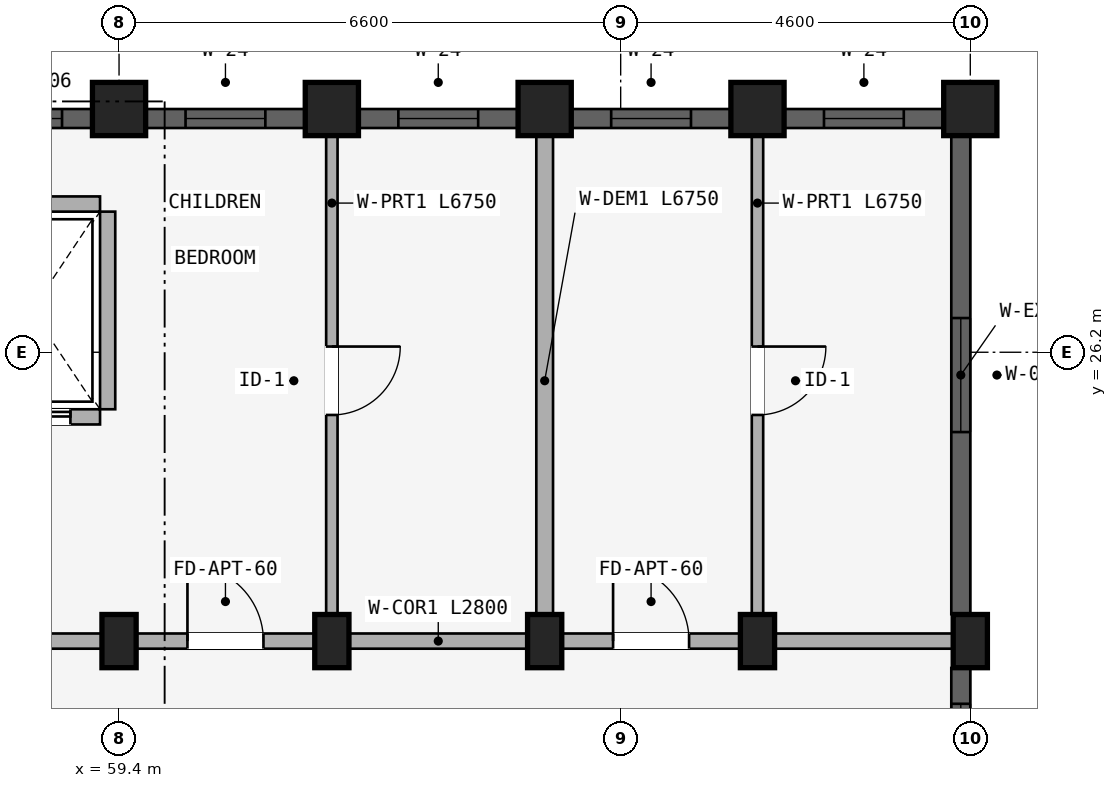
"""IFC4 building model, lengths in metres.
Left out: names, types, materials, properties, quantities, classifications, styles, units other than length and angle.
Written with IfcOpenShell. Run it as: python <this file> out.ifc"""

import sys

from ifc_helpers import new_model, si_unit, direction, frame, frame_2d, origin, origin_2d, place, context, subcontext, project, spatial, rectangle, extrude, element, fill, save


model = new_model("IFC4")
c1 = context("Model", 3, precision=1e-05, world=origin(), true_north=direction((0.0, 1.0)))
c2 = subcontext(c1, "Body", "Model", "MODEL_VIEW")
j1 = project(units=[si_unit("LENGTHUNIT", "METRE"), si_unit("PLANEANGLEUNIT", "RADIAN")], contexts=[c1])
p1 = place(None, origin())
s1 = spatial("IfcSite", under=j1, at=p1, CompositionType="ELEMENT")
p2 = place(p1, origin())
s2 = spatial("IfcBuilding", under=s1, at=p2, CompositionType="ELEMENT")
p3 = place(p2, frame((0.0, 0.0, 21.3)))
s3 = spatial("IfcBuildingStorey", under=s2, at=p3, CompositionType="ELEMENT", Elevation=21.3)
p4 = place(p3, frame((59.4, 29.4, 0.0), z_axis=(0.0, 0.0, 1.0), x_axis=(1.0, 0.0, 0.0)))
e1 = element("IfcColumn", 1, at=p4, inside=s3, PredefinedType="COLUMN", context=c2, shape_type="SweptSolid", body=[
    extrude(rectangle(XDim=0.7, YDim=0.7, at=origin_2d()), origin(), (0.0, 0.0, 1.0), 2.93),
])
p5 = place(p3, frame((59.4, 22.4, 0.0), z_axis=(0.0, 0.0, 1.0), x_axis=(1.0, 0.0, 0.0)))
e2 = element("IfcColumn", 2, at=p5, inside=s3, PredefinedType="COLUMN", context=c2, shape_type="SweptSolid", body=[
    extrude(rectangle(XDim=0.45, YDim=0.7, at=origin_2d()), origin(), (0.0, 0.0, 1.0), 2.93),
])
p6 = place(p3, frame((62.2, 29.4, 0.0), z_axis=(0.0, 0.0, 1.0), x_axis=(1.0, 0.0, 0.0)))
e3 = element("IfcColumn", 3, at=p6, inside=s3, PredefinedType="COLUMN", context=c2, shape_type="SweptSolid", body=[
    extrude(rectangle(XDim=0.7, YDim=0.7, at=origin_2d()), origin(), (0.0, 0.0, 1.0), 2.93),
])
p7 = place(p3, frame((62.2, 22.4, 0.0), z_axis=(0.0, 0.0, 1.0), x_axis=(1.0, 0.0, 0.0)))
e4 = element("IfcColumn", 4, at=p7, inside=s3, PredefinedType="COLUMN", context=c2, shape_type="SweptSolid", body=[
    extrude(rectangle(XDim=0.45, YDim=0.7, at=origin_2d()), origin(), (0.0, 0.0, 1.0), 2.93),
])
p8 = place(p3, frame((65.0, 29.4, 0.0), z_axis=(0.0, 0.0, 1.0), x_axis=(1.0, 0.0, 0.0)))
e5 = element("IfcColumn", 5, at=p8, inside=s3, PredefinedType="COLUMN", context=c2, shape_type="SweptSolid", body=[
    extrude(rectangle(XDim=0.7, YDim=0.7, at=origin_2d()), origin(), (0.0, 0.0, 1.0), 2.93),
])
p9 = place(p3, frame((65.0, 22.4, 0.0), z_axis=(0.0, 0.0, 1.0), x_axis=(1.0, 0.0, 0.0)))
e6 = element("IfcColumn", 6, at=p9, inside=s3, PredefinedType="COLUMN", context=c2, shape_type="SweptSolid", body=[
    extrude(rectangle(XDim=0.45, YDim=0.7, at=origin_2d()), origin(), (0.0, 0.0, 1.0), 2.93),
])
p10 = place(p3, frame((67.8, 29.4, 0.0), z_axis=(0.0, 0.0, 1.0), x_axis=(1.0, 0.0, 0.0)))
e7 = element("IfcColumn", 7, at=p10, inside=s3, PredefinedType="COLUMN", context=c2, shape_type="SweptSolid", body=[
    extrude(rectangle(XDim=0.7, YDim=0.7, at=origin_2d()), origin(), (0.0, 0.0, 1.0), 2.93),
])
p11 = place(p3, frame((67.8, 22.4, 0.0), z_axis=(0.0, 0.0, 1.0), x_axis=(1.0, 0.0, 0.0)))
e8 = element("IfcColumn", 8, at=p11, inside=s3, PredefinedType="COLUMN", context=c2, shape_type="SweptSolid", body=[
    extrude(rectangle(XDim=0.45, YDim=0.7, at=origin_2d()), origin(), (0.0, 0.0, 1.0), 2.93),
])
p12 = place(p3, frame((70.6, 29.4, 0.0), z_axis=(0.0, 0.0, 1.0), x_axis=(1.0, 0.0, 0.0)))
e9 = element("IfcColumn", 9, at=p12, inside=s3, PredefinedType="COLUMN", context=c2, shape_type="SweptSolid", body=[
    extrude(rectangle(XDim=0.7, YDim=0.7, at=origin_2d()), origin(), (0.0, 0.0, 1.0), 2.93),
])
p13 = place(p3, frame((70.6, 22.4, 0.0), z_axis=(0.0, 0.0, 1.0), x_axis=(1.0, 0.0, 0.0)))
e10 = element("IfcColumn", 10, at=p13, inside=s3, PredefinedType="COLUMN", context=c2, shape_type="SweptSolid", body=[
    extrude(rectangle(XDim=0.45, YDim=0.7, at=origin_2d()), origin(), (0.0, 0.0, 1.0), 2.93),
])
p14 = place(p3, frame((59.25, 28.05, 0.0), z_axis=(0.0, 0.0, 1.0), x_axis=(0.0, -1.0, 0.0)))
e11 = element("IfcWall", 11, at=p14, inside=s3, PredefinedType="STANDARD", context=c2, shape_type="SweptSolid", body=[
    extrude(rectangle(XDim=2.6, YDim=0.2, at=frame_2d((1.3, 0.0))), origin(), (0.0, 0.0, 1.0), 2.372),
])
p15 = place(p3, frame((57.35, 28.15, 0.0), z_axis=(0.0, 0.0, 1.0), x_axis=(1.0, 0.0, 0.0)))
e12 = element("IfcWall", 12, at=p15, inside=s3, PredefinedType="STANDARD", context=c2, shape_type="SweptSolid", body=[
    extrude(rectangle(XDim=1.8, YDim=0.2, at=frame_2d((0.9, 0.0))), origin(), (0.0, 0.0, 1.0), 2.93),
])
p16 = place(p3, frame((57.35, 25.35, 0.0), z_axis=(0.0, 0.0, 1.0), x_axis=(1.0, 0.0, 0.0)))
e13 = element("IfcWall", 13, at=p16, inside=s3, PredefinedType="STANDARD", context=c2, shape_type="SweptSolid", body=[
    extrude(rectangle(XDim=1.8, YDim=0.2, at=frame_2d((0.9, 0.0))), origin(), (0.0, 0.0, 1.0), 2.93),
])
p17 = place(p16, frame((0.39, 0.0, 0.0)))
e14 = element("IfcOpeningElement", 14, at=p17, cuts=e13, PredefinedType="OPENING", context=c2, shape_type="SweptSolid", body=[
    extrude(rectangle(XDim=1.02, YDim=2.15, at=frame_2d((0.51, 1.075))), frame((0.0, 0.11, 0.0), z_axis=(0.0, -1.0, 0.0), x_axis=(1.0, 0.0, 0.0)), (0.0, 0.0, 1.0), 0.22),
])
p18 = place(p3, frame((53.75, 22.4, 0.0), z_axis=(0.0, 0.0, 1.0), x_axis=(1.0, 0.0, 0.0)))
e15 = element("IfcWall", 15, at=p18, inside=s3, PredefinedType="STANDARD", context=c2, shape_type="SweptSolid", body=[
    extrude(rectangle(XDim=5.6, YDim=0.2, at=frame_2d((2.8, 0.0))), origin(), (0.0, 0.0, 1.0), 2.372),
])
p19 = place(p18, frame((1.91, 0.0, 0.0)))
e16 = element("IfcOpeningElement", 16, at=p19, cuts=e15, PredefinedType="OPENING", context=c2, shape_type="SweptSolid", body=[
    extrude(rectangle(XDim=1.22, YDim=2.15, at=frame_2d((0.61, 1.075))), frame((0.0, 0.11, 0.0), z_axis=(0.0, -1.0, 0.0), x_axis=(1.0, 0.0, 0.0)), (0.0, 0.0, 1.0), 0.22),
])
p20 = place(p3, frame((59.4, 22.4, 0.0), z_axis=(0.0, 0.0, 1.0), x_axis=(1.0, 0.0, 0.0)))
e17 = element("IfcWall", 17, at=p20, inside=s3, PredefinedType="STANDARD", context=c2, shape_type="SweptSolid", body=[
    extrude(rectangle(XDim=2.8, YDim=0.2, at=frame_2d((1.4, 0.0))), origin(), (0.0, 0.0, 1.0), 2.372),
])
p21 = place(p20, frame((0.9, 0.0, 0.0)))
e18 = element("IfcOpeningElement", 18, at=p21, cuts=e17, PredefinedType="OPENING", context=c2, shape_type="SweptSolid", body=[
    extrude(rectangle(XDim=1.0, YDim=2.15, at=frame_2d((0.5, 1.075))), frame((0.0, 0.11, 0.0), z_axis=(0.0, -1.0, 0.0), x_axis=(1.0, 0.0, 0.0)), (0.0, 0.0, 1.0), 0.22),
])
p22 = place(p3, frame((62.2, 22.4, 0.0), z_axis=(0.0, 0.0, 1.0), x_axis=(1.0, 0.0, 0.0)))
e19 = element("IfcWall", 19, at=p22, inside=s3, PredefinedType="STANDARD", context=c2, shape_type="SweptSolid", body=[
    extrude(rectangle(XDim=2.8, YDim=0.2, at=frame_2d((1.4, 0.0))), origin(), (0.0, 0.0, 1.0), 2.372),
])
p23 = place(p3, frame((65.0, 22.4, 0.0), z_axis=(0.0, 0.0, 1.0), x_axis=(1.0, 0.0, 0.0)))
e20 = element("IfcWall", 20, at=p23, inside=s3, PredefinedType="STANDARD", context=c2, shape_type="SweptSolid", body=[
    extrude(rectangle(XDim=2.8, YDim=0.2, at=frame_2d((1.4, 0.0))), origin(), (0.0, 0.0, 1.0), 2.372),
])
p24 = place(p23, frame((0.9, 0.0, 0.0)))
e21 = element("IfcOpeningElement", 21, at=p24, cuts=e20, PredefinedType="OPENING", context=c2, shape_type="SweptSolid", body=[
    extrude(rectangle(XDim=1.0, YDim=2.15, at=frame_2d((0.5, 1.075))), frame((0.0, 0.11, 0.0), z_axis=(0.0, -1.0, 0.0), x_axis=(1.0, 0.0, 0.0)), (0.0, 0.0, 1.0), 0.22),
])
p25 = place(p3, frame((67.8, 22.4, 0.0), z_axis=(0.0, 0.0, 1.0), x_axis=(1.0, 0.0, 0.0)))
e22 = element("IfcWall", 22, at=p25, inside=s3, PredefinedType="STANDARD", context=c2, shape_type="SweptSolid", body=[
    extrude(rectangle(XDim=2.8, YDim=0.2, at=frame_2d((1.4, 0.0))), origin(), (0.0, 0.0, 1.0), 2.372),
])
p26 = place(p3, frame((62.2, 29.2, 0.0), z_axis=(0.0, 0.0, 1.0), x_axis=(0.0, -1.0, 0.0)))
e23 = element("IfcWall", 23, at=p26, inside=s3, PredefinedType="PARTITIONING", context=c2, shape_type="SweptSolid", body=[
    extrude(rectangle(XDim=6.75, YDim=0.15, at=frame_2d((3.375, 0.0))), origin(), (0.0, 0.0, 1.0), 2.372),
])
p27 = place(p26, frame((2.925, 0.0, 0.0)))
e24 = element("IfcOpeningElement", 24, at=p27, cuts=e23, PredefinedType="OPENING", context=c2, shape_type="SweptSolid", body=[
    extrude(rectangle(XDim=0.9, YDim=2.1, at=frame_2d((0.45, 1.05))), frame((0.0, 0.085, 0.0), z_axis=(0.0, -1.0, 0.0), x_axis=(1.0, 0.0, 0.0)), (0.0, 0.0, 1.0), 0.17),
])
p28 = place(p3, frame((65.0, 29.2, 0.0), z_axis=(0.0, 0.0, 1.0), x_axis=(0.0, -1.0, 0.0)))
e25 = element("IfcWall", 25, at=p28, inside=s3, PredefinedType="STANDARD", context=c2, shape_type="SweptSolid", body=[
    extrude(rectangle(XDim=6.75, YDim=0.22, at=frame_2d((3.375, 0.0))), origin(), (0.0, 0.0, 1.0), 2.372),
])
p29 = place(p3, frame((67.8, 29.2, 0.0), z_axis=(0.0, 0.0, 1.0), x_axis=(0.0, -1.0, 0.0)))
e26 = element("IfcWall", 26, at=p29, inside=s3, PredefinedType="PARTITIONING", context=c2, shape_type="SweptSolid", body=[
    extrude(rectangle(XDim=6.75, YDim=0.15, at=frame_2d((3.375, 0.0))), origin(), (0.0, 0.0, 1.0), 2.372),
])
p30 = place(p29, frame((2.925, 0.0, 0.0)))
e27 = element("IfcOpeningElement", 27, at=p30, cuts=e26, PredefinedType="OPENING", context=c2, shape_type="SweptSolid", body=[
    extrude(rectangle(XDim=0.9, YDim=2.1, at=frame_2d((0.45, 1.05))), frame((0.0, 0.085, 0.0), z_axis=(0.0, -1.0, 0.0), x_axis=(1.0, 0.0, 0.0)), (0.0, 0.0, 1.0), 0.17),
])
p31 = place(p3, frame((56.628, 29.275, 0.0), z_axis=(0.0, 0.0, 1.0), x_axis=(1.0, 0.0, 0.0)))
e28 = element("IfcWall", 28, at=p31, inside=s3, PredefinedType="STANDARD", context=c2, shape_type="SweptSolid", body=[
    extrude(rectangle(XDim=2.422, YDim=0.25, at=frame_2d((1.211, 0.0))), origin(), (0.0, 0.0, 1.0), 2.472),
])
p32 = place(p31, frame((0.822, 0.0, 0.772)))
e29 = element("IfcOpeningElement", 29, at=p32, cuts=e28, PredefinedType="OPENING", context=c2, shape_type="SweptSolid", body=[
    extrude(rectangle(XDim=1.2, YDim=1.5, at=frame_2d((0.6, 0.75))), frame((0.0, 0.135, 0.0), z_axis=(0.0, -1.0, 0.0), x_axis=(1.0, 0.0, 0.0)), (0.0, 0.0, 1.0), 0.27),
])
p33 = place(p3, frame((59.753, 29.275, 0.0), z_axis=(0.0, 0.0, 1.0), x_axis=(1.0, 0.0, 0.0)))
e30 = element("IfcWall", 30, at=p33, inside=s3, PredefinedType="STANDARD", context=c2, shape_type="SweptSolid", body=[
    extrude(rectangle(XDim=2.093, YDim=0.25, at=frame_2d((1.046, 0.0))), origin(), (0.0, 0.0, 1.0), 2.472),
])
p34 = place(p33, frame((0.521, 0.0, 0.88)))
e31 = element("IfcOpeningElement", 31, at=p34, cuts=e30, PredefinedType="OPENING", context=c2, shape_type="SweptSolid", body=[
    extrude(rectangle(XDim=1.05, YDim=1.25, at=frame_2d((0.525, 0.625))), frame((0.0, 0.135, 0.0), z_axis=(0.0, -1.0, 0.0), x_axis=(1.0, 0.0, 0.0)), (0.0, 0.0, 1.0), 0.27),
])
p35 = place(p3, frame((62.553, 29.275, 0.0), z_axis=(0.0, 0.0, 1.0), x_axis=(1.0, 0.0, 0.0)))
e32 = element("IfcWall", 32, at=p35, inside=s3, PredefinedType="STANDARD", context=c2, shape_type="SweptSolid", body=[
    extrude(rectangle(XDim=2.093, YDim=0.25, at=frame_2d((1.046, 0.0))), origin(), (0.0, 0.0, 1.0), 2.472),
])
p36 = place(p35, frame((0.521, 0.0, 0.88)))
e33 = element("IfcOpeningElement", 33, at=p36, cuts=e32, PredefinedType="OPENING", context=c2, shape_type="SweptSolid", body=[
    extrude(rectangle(XDim=1.05, YDim=1.25, at=frame_2d((0.525, 0.625))), frame((0.0, 0.135, 0.0), z_axis=(0.0, -1.0, 0.0), x_axis=(1.0, 0.0, 0.0)), (0.0, 0.0, 1.0), 0.27),
])
p37 = place(p3, frame((65.354, 29.275, 0.0), z_axis=(0.0, 0.0, 1.0), x_axis=(1.0, 0.0, 0.0)))
e34 = element("IfcWall", 34, at=p37, inside=s3, PredefinedType="STANDARD", context=c2, shape_type="SweptSolid", body=[
    extrude(rectangle(XDim=2.093, YDim=0.25, at=frame_2d((1.046, 0.0))), origin(), (0.0, 0.0, 1.0), 2.472),
])
p38 = place(p37, frame((0.521, 0.0, 0.88)))
e35 = element("IfcOpeningElement", 35, at=p38, cuts=e34, PredefinedType="OPENING", context=c2, shape_type="SweptSolid", body=[
    extrude(rectangle(XDim=1.05, YDim=1.25, at=frame_2d((0.525, 0.625))), frame((0.0, 0.135, 0.0), z_axis=(0.0, -1.0, 0.0), x_axis=(1.0, 0.0, 0.0)), (0.0, 0.0, 1.0), 0.27),
])
p39 = place(p3, frame((68.154, 29.275, 0.0), z_axis=(0.0, 0.0, 1.0), x_axis=(1.0, 0.0, 0.0)))
e36 = element("IfcWall", 36, at=p39, inside=s3, PredefinedType="STANDARD", context=c2, shape_type="SweptSolid", body=[
    extrude(rectangle(XDim=2.093, YDim=0.25, at=frame_2d((1.046, 0.0))), origin(), (0.0, 0.0, 1.0), 2.472),
])
p40 = place(p39, frame((0.521, 0.0, 0.88)))
e37 = element("IfcOpeningElement", 37, at=p40, cuts=e36, PredefinedType="OPENING", context=c2, shape_type="SweptSolid", body=[
    extrude(rectangle(XDim=1.05, YDim=1.25, at=frame_2d((0.525, 0.625))), frame((0.0, 0.135, 0.0), z_axis=(0.0, -1.0, 0.0), x_axis=(1.0, 0.0, 0.0)), (0.0, 0.0, 1.0), 0.27),
])
p41 = place(p3, frame((70.475, 29.046, 0.0), z_axis=(0.0, 0.0, 1.0), x_axis=(0.0, -1.0, 0.0)))
e38 = element("IfcWall", 38, at=p41, inside=s3, PredefinedType="STANDARD", context=c2, shape_type="SweptSolid", body=[
    extrude(rectangle(XDim=6.293, YDim=0.25, at=frame_2d((3.146, 0.0))), origin(), (0.0, 0.0, 1.0), 2.372),
])
p42 = place(p41, frame((2.396, 0.0, 0.522)))
e39 = element("IfcOpeningElement", 39, at=p42, cuts=e38, PredefinedType="OPENING", context=c2, shape_type="SweptSolid", body=[
    extrude(rectangle(XDim=1.5, YDim=1.65, at=frame_2d((0.75, 0.825))), frame((0.0, 0.135, 0.0), z_axis=(0.0, -1.0, 0.0), x_axis=(1.0, 0.0, 0.0)), (0.0, 0.0, 1.0), 0.27),
])
p43 = place(p3, frame((70.475, 22.046, 0.0), z_axis=(0.0, 0.0, 1.0), x_axis=(0.0, -1.0, 0.0)))
e40 = element("IfcWall", 40, at=p43, inside=s3, PredefinedType="STANDARD", context=c2, shape_type="SweptSolid", body=[
    extrude(rectangle(XDim=1.693, YDim=0.25, at=frame_2d((0.846, 0.0))), origin(), (0.0, 0.0, 1.0), 2.372),
])
p44 = place(p43, frame((0.471, 0.0, 0.88)))
e41 = element("IfcOpeningElement", 41, at=p44, cuts=e40, PredefinedType="OPENING", context=c2, shape_type="SweptSolid", body=[
    extrude(rectangle(XDim=0.75, YDim=1.05, at=frame_2d((0.375, 0.525))), frame((0.0, 0.135, 0.0), z_axis=(0.0, -1.0, 0.0), x_axis=(1.0, 0.0, 0.0)), (0.0, 0.0, 1.0), 0.27),
])
p45 = place(p32, origin())
e42 = element("IfcWindow", 42, at=p45, inside=s3, PartitioningType="SINGLE_PANEL", PredefinedType="WINDOW", context=c2, shape_type="SweptSolid", body=[
    extrude(rectangle(XDim=1.2, YDim=1.5, at=frame_2d((0.6, 0.75))), frame((0.0, 0.03, 0.0), z_axis=(0.0, -1.0, 0.0), x_axis=(1.0, 0.0, 0.0)), (0.0, 0.0, 1.0), 0.06),
])
fill(e29, e42)
p46 = place(p34, origin())
e43 = element("IfcWindow", 43, at=p46, inside=s3, PartitioningType="SINGLE_PANEL", PredefinedType="WINDOW", context=c2, shape_type="SweptSolid", body=[
    extrude(rectangle(XDim=1.05, YDim=1.25, at=frame_2d((0.525, 0.625))), frame((0.0, 0.03, 0.0), z_axis=(0.0, -1.0, 0.0), x_axis=(1.0, 0.0, 0.0)), (0.0, 0.0, 1.0), 0.06),
])
fill(e31, e43)
p47 = place(p36, origin())
e44 = element("IfcWindow", 44, at=p47, inside=s3, PartitioningType="SINGLE_PANEL", PredefinedType="WINDOW", context=c2, shape_type="SweptSolid", body=[
    extrude(rectangle(XDim=1.05, YDim=1.25, at=frame_2d((0.525, 0.625))), frame((0.0, 0.03, 0.0), z_axis=(0.0, -1.0, 0.0), x_axis=(1.0, 0.0, 0.0)), (0.0, 0.0, 1.0), 0.06),
])
fill(e33, e44)
p48 = place(p38, origin())
e45 = element("IfcWindow", 45, at=p48, inside=s3, PartitioningType="SINGLE_PANEL", PredefinedType="WINDOW", context=c2, shape_type="SweptSolid", body=[
    extrude(rectangle(XDim=1.05, YDim=1.25, at=frame_2d((0.525, 0.625))), frame((0.0, 0.03, 0.0), z_axis=(0.0, -1.0, 0.0), x_axis=(1.0, 0.0, 0.0)), (0.0, 0.0, 1.0), 0.06),
])
fill(e35, e45)
p49 = place(p40, origin())
e46 = element("IfcWindow", 46, at=p49, inside=s3, PartitioningType="SINGLE_PANEL", PredefinedType="WINDOW", context=c2, shape_type="SweptSolid", body=[
    extrude(rectangle(XDim=1.05, YDim=1.25, at=frame_2d((0.525, 0.625))), frame((0.0, 0.03, 0.0), z_axis=(0.0, -1.0, 0.0), x_axis=(1.0, 0.0, 0.0)), (0.0, 0.0, 1.0), 0.06),
])
fill(e37, e46)
p50 = place(p42, origin())
e47 = element("IfcWindow", 47, at=p50, inside=s3, PartitioningType="DOUBLE_PANEL_VERTICAL", PredefinedType="WINDOW", context=c2, shape_type="SweptSolid", body=[
    extrude(rectangle(XDim=1.5, YDim=1.65, at=frame_2d((0.75, 0.825))), frame((0.0, 0.03, 0.0), z_axis=(0.0, -1.0, 0.0), x_axis=(1.0, 0.0, 0.0)), (0.0, 0.0, 1.0), 0.06),
])
fill(e39, e47)
p51 = place(p44, origin())
e48 = element("IfcWindow", 48, at=p51, inside=s3, PartitioningType="SINGLE_PANEL", PredefinedType="WINDOW", context=c2, shape_type="SweptSolid", body=[
    extrude(rectangle(XDim=0.75, YDim=1.05, at=frame_2d((0.375, 0.525))), frame((0.0, 0.03, 0.0), z_axis=(0.0, -1.0, 0.0), x_axis=(1.0, 0.0, 0.0)), (0.0, 0.0, 1.0), 0.06),
])
fill(e41, e48)
p52 = place(p17, origin())
e49 = element("IfcDoor", 49, at=p52, inside=s3, OperationType="SLIDING_TO_RIGHT", PredefinedType="DOOR", context=c2, shape_type="SweptSolid", body=[
    extrude(rectangle(XDim=1.02, YDim=2.15, at=frame_2d((0.51, 1.075))), frame((0.0, 0.025, 0.0), z_axis=(0.0, -1.0, 0.0), x_axis=(1.0, 0.0, 0.0)), (0.0, 0.0, 1.0), 0.05),
])
fill(e14, e49)
p53 = place(p21, frame((1.0, 0.0, 0.0), z_axis=(0.0, 0.0, 1.0), x_axis=(-1.0, 0.0, 0.0)))
e50 = element("IfcDoor", 50, at=p53, inside=s3, OperationType="SINGLE_SWING_RIGHT", PredefinedType="DOOR", context=c2, shape_type="SweptSolid", body=[
    extrude(rectangle(XDim=1.0, YDim=2.15, at=frame_2d((0.5, 1.075))), frame((0.0, 0.025, 0.0), z_axis=(0.0, -1.0, 0.0), x_axis=(1.0, 0.0, 0.0)), (0.0, 0.0, 1.0), 0.05),
])
fill(e18, e50)
p54 = place(p24, frame((1.0, 0.0, 0.0), z_axis=(0.0, 0.0, 1.0), x_axis=(-1.0, 0.0, 0.0)))
e51 = element("IfcDoor", 51, at=p54, inside=s3, OperationType="SINGLE_SWING_RIGHT", PredefinedType="DOOR", context=c2, shape_type="SweptSolid", body=[
    extrude(rectangle(XDim=1.0, YDim=2.15, at=frame_2d((0.5, 1.075))), frame((0.0, 0.025, 0.0), z_axis=(0.0, -1.0, 0.0), x_axis=(1.0, 0.0, 0.0)), (0.0, 0.0, 1.0), 0.05),
])
fill(e21, e51)
p55 = place(p27, origin())
e52 = element("IfcDoor", 52, at=p55, inside=s3, OperationType="SINGLE_SWING_LEFT", PredefinedType="DOOR", context=c2, shape_type="SweptSolid", body=[
    extrude(rectangle(XDim=0.9, YDim=2.1, at=frame_2d((0.45, 1.05))), frame((0.0, 0.025, 0.0), z_axis=(0.0, -1.0, 0.0), x_axis=(1.0, 0.0, 0.0)), (0.0, 0.0, 1.0), 0.05),
])
fill(e24, e52)
p56 = place(p30, frame((0.9, 0.0, 0.0), z_axis=(0.0, 0.0, 1.0), x_axis=(-1.0, 0.0, 0.0)))
e53 = element("IfcDoor", 53, at=p56, inside=s3, OperationType="SINGLE_SWING_RIGHT", PredefinedType="DOOR", context=c2, shape_type="SweptSolid", body=[
    extrude(rectangle(XDim=0.9, YDim=2.1, at=frame_2d((0.45, 1.05))), frame((0.0, 0.025, 0.0), z_axis=(0.0, -1.0, 0.0), x_axis=(1.0, 0.0, 0.0)), (0.0, 0.0, 1.0), 0.05),
])
fill(e27, e53)
save(model, sys.argv[1])
